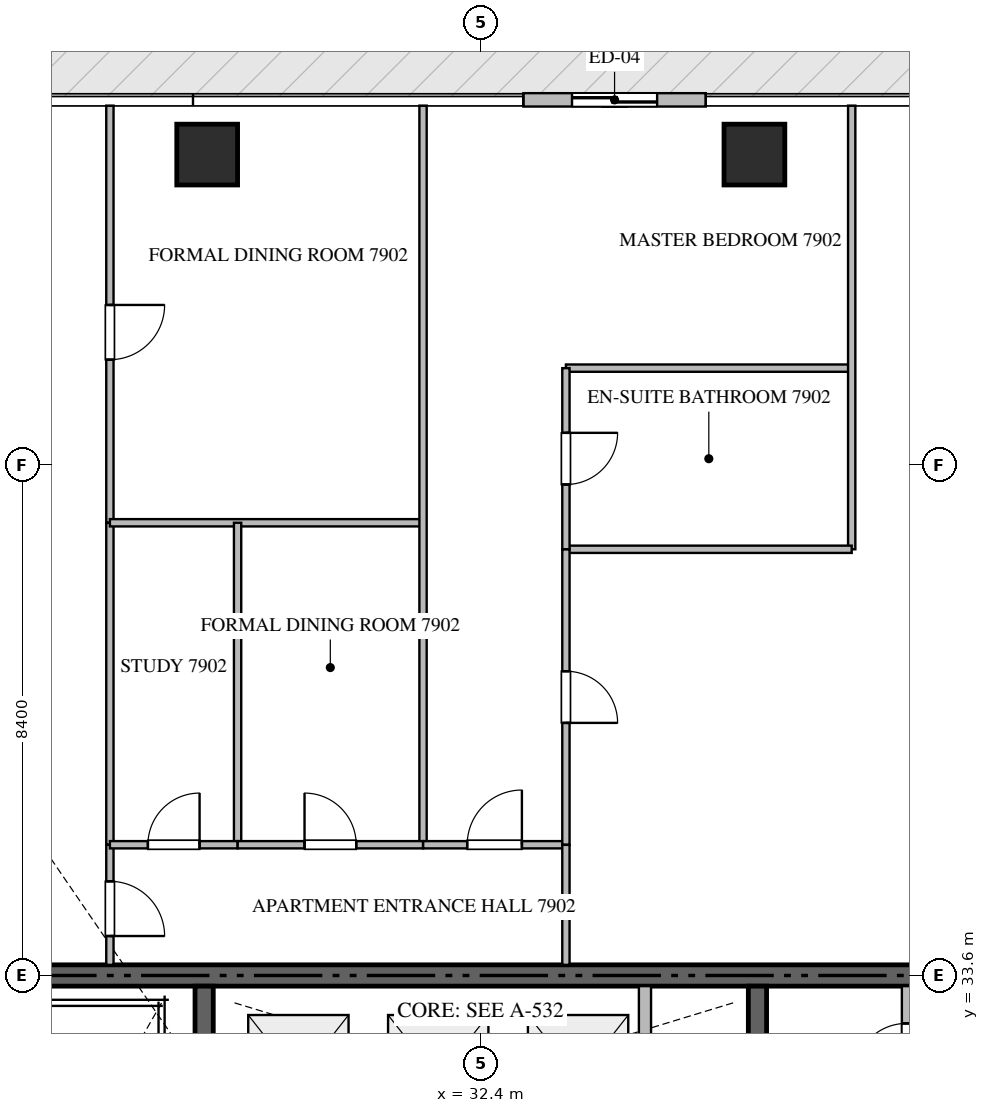
"""IFC4 building model, lengths in metres.
Left out: names, types, materials, properties, quantities, classifications, styles, units other than length and angle.
Written with IfcOpenShell. Run it as: python <this file> out.ifc"""

import sys

from ifc_helpers import new_model, si_unit, direction, frame, frame_2d, origin, origin_2d, place, context, subcontext, project, spatial, rectangle, extrude, source, transform, mapped, element, fill, save


model = new_model("IFC4")
c1 = context("Model", 3, precision=1e-05, world=origin(), true_north=direction((0.0, 1.0)))
c2 = subcontext(c1, "Body", "Model", "MODEL_VIEW")
j1 = project(units=[si_unit("LENGTHUNIT", "METRE"), si_unit("PLANEANGLEUNIT", "RADIAN")], contexts=[c1])
p1 = place(None, origin())
s1 = spatial("IfcSite", under=j1, at=p1, CompositionType="ELEMENT")
p2 = place(p1, origin())
s2 = spatial("IfcBuilding", under=s1, at=p2, CompositionType="ELEMENT")
p3 = place(p2, frame((0.0, 0.0, 317.75)))
s3 = spatial("IfcBuildingStorey", under=s2, at=p3, CompositionType="ELEMENT", Elevation=317.75)
p4 = place(p3, frame((41.4, 33.6, -0.26), z_axis=(0.0, 0.0, 1.0), x_axis=(-1.0, 0.0, 0.0)))
e1 = element("IfcWall", 1, at=p4, inside=s3, PredefinedType="SHEAR", context=c2, shape_type="SweptSolid", body=[
    extrude(rectangle(XDim=18.0, YDim=0.35, at=frame_2d((9.0, 0.0))), origin(), (0.0, 0.0, 1.0), 4.048),
])
p5 = place(p3, frame((27.85, 23.55, -0.26), z_axis=(0.0, 0.0, 1.0), x_axis=(0.0, 1.0, 0.0)))
e2 = element("IfcWall", 2, at=p5, inside=s3, PredefinedType="SHEAR", context=c2, shape_type="SweptSolid", body=[
    extrude(rectangle(XDim=9.875, YDim=0.3, at=frame_2d((4.938, 0.0))), origin(), (0.0, 0.0, 1.0), 4.048),
])
p6 = place(p3, frame((36.95, 27.05, -0.26), z_axis=(0.0, 0.0, 1.0), x_axis=(0.0, 1.0, 0.0)))
e3 = element("IfcWall", 3, at=p6, inside=s3, PredefinedType="SHEAR", context=c2, shape_type="SweptSolid", body=[
    extrude(rectangle(XDim=6.375, YDim=0.3, at=frame_2d((3.188, 0.0))), origin(), (0.0, 0.0, 1.0), 4.048),
])
m1 = source(origin(), c2, "Body", "SweptSolid", [
    extrude(rectangle(XDim=1.0, YDim=1.0, at=origin_2d()), origin(), (0.0, 0.0, 1.0), 4.05),
])
for number, where, z_axis, x_axis in (
    (4, (27.9, 47.1, -0.26), (0.0, 0.0, 1.0), (1.0, 0.0, 0.0)),
    (5, (36.9, 47.1, -0.26), (0.0, 0.0, 1.0), (1.0, 0.0, 0.0)),
):
    element("IfcColumn", number, at=place(p3, frame(where, z_axis=z_axis, x_axis=x_axis)), inside=s3, PredefinedType="COLUMN", context=c2, shape_type="MappedRepresentation", body=[
        mapped(m1, transform((0.0, 0.0, 0.0), scale=1.0)),
    ])
p7 = place(p3, frame((36.1, 48.0, 0.0), z_axis=(0.0, 0.0, 1.0), x_axis=(-1.0, 0.0, 0.0)))
e6 = element("IfcWall", 6, at=p7, inside=s3, PredefinedType="ELEMENTEDWALL", context=c2, shape_type="SweptSolid", body=[
    extrude(rectangle(XDim=3.0, YDim=0.22, at=frame_2d((1.5, 0.0))), origin(), (0.0, 0.0, 1.0), 3.775),
])
p8 = place(p7, frame((0.8, 0.0, 0.0)))
e7 = element("IfcOpeningElement", 7, at=p8, cuts=e6, PredefinedType="OPENING", context=c2, shape_type="SweptSolid", body=[
    extrude(rectangle(XDim=1.4, YDim=2.25, at=frame_2d((0.7, 1.125))), frame((0.0, 0.12, 0.0), z_axis=(0.0, -1.0, 0.0), x_axis=(1.0, 0.0, 0.0)), (0.0, 0.0, 1.0), 0.24),
])
p9 = place(p3, frame((35.1, 30.75, 0.0), z_axis=(0.0, 0.0, 1.0), x_axis=(0.0, 1.0, 0.0)))
e8 = element("IfcWall", 8, at=p9, inside=s3, PredefinedType="STANDARD", context=c2, shape_type="SweptSolid", body=[
    extrude(rectangle(XDim=2.675, YDim=0.2, at=frame_2d((1.337, 0.0))), origin(), (0.0, 0.0, 1.0), 3.79),
])
p10 = place(p3, frame((39.4, 31.35, 0.0), z_axis=(0.0, 0.0, 1.0), x_axis=(0.0, 1.0, 0.0)))
e9 = element("IfcWall", 9, at=p10, inside=s3, PredefinedType="PARTITIONING", context=c2, shape_type="SweptSolid", body=[
    extrude(rectangle(XDim=2.075, YDim=0.15, at=frame_2d((1.038, 0.0))), origin(), (0.0, 0.0, 1.0), 3.79),
])
p11 = place(p10, frame((0.612, 0.0, 0.0)))
e10 = element("IfcOpeningElement", 10, at=p11, cuts=e9, PredefinedType="OPENING", context=c2, shape_type="SweptSolid", body=[
    extrude(rectangle(XDim=0.85, YDim=2.1, at=frame_2d((0.425, 1.05))), frame((0.0, 0.085, 0.0), z_axis=(0.0, -1.0, 0.0), x_axis=(1.0, 0.0, 0.0)), (0.0, 0.0, 1.0), 0.17),
])
p12 = place(p3, frame((26.3, 35.75, 0.0), z_axis=(0.0, 0.0, 1.0), x_axis=(0.0, -1.0, 0.0)))
e11 = element("IfcWall", 11, at=p12, inside=s3, PredefinedType="PARTITIONING", context=c2, shape_type="SweptSolid", body=[
    extrude(rectangle(XDim=1.975, YDim=0.12, at=frame_2d((0.988, 0.0))), origin(), (0.0, 0.0, 1.0), 3.79),
])
p13 = place(p12, frame((0.601, 0.0, 0.0)))
e12 = element("IfcOpeningElement", 12, at=p13, cuts=e11, PredefinedType="OPENING", context=c2, shape_type="SweptSolid", body=[
    extrude(rectangle(XDim=0.9, YDim=2.1, at=frame_2d((0.45, 1.05))), frame((0.0, 0.07, 0.0), z_axis=(0.0, -1.0, 0.0), x_axis=(1.0, 0.0, 0.0)), (0.0, 0.0, 1.0), 0.14),
])
p14 = place(p3, frame((26.3, 47.905, 0.0), z_axis=(0.0, 0.0, 1.0), x_axis=(0.0, -1.0, 0.0)))
e13 = element("IfcWall", 13, at=p14, inside=s3, PredefinedType="PARTITIONING", context=c2, shape_type="SweptSolid", body=[
    extrude(rectangle(XDim=6.86, YDim=0.12, at=frame_2d((3.43, 0.0))), origin(), (0.0, 0.0, 1.0), 3.79),
])
p15 = place(p14, frame((3.278, 0.0, 0.0)))
e14 = element("IfcOpeningElement", 14, at=p15, cuts=e13, PredefinedType="OPENING", context=c2, shape_type="SweptSolid", body=[
    extrude(rectangle(XDim=0.9, YDim=2.1, at=frame_2d((0.45, 1.05))), frame((0.0, 0.07, 0.0), z_axis=(0.0, -1.0, 0.0), x_axis=(1.0, 0.0, 0.0)), (0.0, 0.0, 1.0), 0.14),
])
p16 = place(p3, frame((26.3, 41.043, 0.0), z_axis=(0.0, 0.0, 1.0), x_axis=(0.0, -1.0, 0.0)))
e15 = element("IfcWall", 15, at=p16, inside=s3, PredefinedType="PARTITIONING", context=c2, shape_type="SweptSolid", body=[
    extrude(rectangle(XDim=5.291, YDim=0.12, at=frame_2d((2.646, 0.0))), origin(), (0.0, 0.0, 1.0), 3.79),
])
p17 = place(p3, frame((26.3, 41.045, 0.0), z_axis=(0.0, 0.0, 1.0), x_axis=(1.0, 0.0, 0.0)))
e16 = element("IfcWall", 16, at=p17, inside=s3, PredefinedType="PARTITIONING", context=c2, shape_type="SweptSolid", body=[
    extrude(rectangle(XDim=5.15, YDim=0.12, at=frame_2d((2.575, 0.0))), origin(), (0.0, 0.0, 1.0), 3.79),
])
p18 = place(p3, frame((31.45, 47.905, 0.0), z_axis=(0.0, 0.0, 1.0), x_axis=(0.0, -1.0, 0.0)))
e17 = element("IfcWall", 17, at=p18, inside=s3, PredefinedType="PARTITIONING", context=c2, shape_type="SweptSolid", body=[
    extrude(rectangle(XDim=12.155, YDim=0.12, at=frame_2d((6.078, 0.0))), origin(), (0.0, 0.0, 1.0), 3.79),
])
p19 = place(p3, frame((28.4, 41.045, 0.0), z_axis=(0.0, 0.0, 1.0), x_axis=(0.0, -1.0, 0.0)))
e18 = element("IfcWall", 18, at=p19, inside=s3, PredefinedType="PARTITIONING", context=c2, shape_type="SweptSolid", body=[
    extrude(rectangle(XDim=5.295, YDim=0.12, at=frame_2d((2.647, 0.0))), origin(), (0.0, 0.0, 1.0), 3.79),
])
p20 = place(p3, frame((26.3, 35.75, 0.0), z_axis=(0.0, 0.0, 1.0), x_axis=(1.0, 0.0, 0.0)))
e19 = element("IfcWall", 19, at=p20, inside=s3, PredefinedType="PARTITIONING", context=c2, shape_type="SweptSolid", body=[
    extrude(rectangle(XDim=2.1, YDim=0.12, at=frame_2d((1.05, 0.0))), origin(), (0.0, 0.0, 1.0), 3.79),
])
p21 = place(p20, frame((0.625, 0.0, 0.0)))
e20 = element("IfcOpeningElement", 20, at=p21, cuts=e19, PredefinedType="OPENING", context=c2, shape_type="SweptSolid", body=[
    extrude(rectangle(XDim=0.85, YDim=2.1, at=frame_2d((0.425, 1.05))), frame((0.0, 0.07, 0.0), z_axis=(0.0, -1.0, 0.0), x_axis=(1.0, 0.0, 0.0)), (0.0, 0.0, 1.0), 0.14),
])
p22 = place(p3, frame((28.402, 35.75, 0.0), z_axis=(0.0, 0.0, 1.0), x_axis=(1.0, 0.0, 0.0)))
e21 = element("IfcWall", 21, at=p22, inside=s3, PredefinedType="PARTITIONING", context=c2, shape_type="SweptSolid", body=[
    extrude(rectangle(XDim=3.048, YDim=0.12, at=frame_2d((1.524, 0.0))), origin(), (0.0, 0.0, 1.0), 3.79),
])
p23 = place(p22, frame((1.099, 0.0, 0.0)))
e22 = element("IfcOpeningElement", 22, at=p23, cuts=e21, PredefinedType="OPENING", context=c2, shape_type="SweptSolid", body=[
    extrude(rectangle(XDim=0.85, YDim=2.1, at=frame_2d((0.425, 1.05))), frame((0.0, 0.07, 0.0), z_axis=(0.0, -1.0, 0.0), x_axis=(1.0, 0.0, 0.0)), (0.0, 0.0, 1.0), 0.14),
])
p24 = place(p3, frame((31.452, 35.75, 0.0), z_axis=(0.0, 0.0, 1.0), x_axis=(1.0, 0.0, 0.0)))
e23 = element("IfcWall", 23, at=p24, inside=s3, PredefinedType="PARTITIONING", context=c2, shape_type="SweptSolid", body=[
    extrude(rectangle(XDim=2.348, YDim=0.12, at=frame_2d((1.174, 0.0))), origin(), (0.0, 0.0, 1.0), 3.79),
])
p25 = place(p24, frame((0.724, 0.0, 0.0)))
e24 = element("IfcOpeningElement", 24, at=p25, cuts=e23, PredefinedType="OPENING", context=c2, shape_type="SweptSolid", body=[
    extrude(rectangle(XDim=0.9, YDim=2.1, at=frame_2d((0.45, 1.05))), frame((0.0, 0.07, 0.0), z_axis=(0.0, -1.0, 0.0), x_axis=(1.0, 0.0, 0.0)), (0.0, 0.0, 1.0), 0.14),
])
p26 = place(p3, frame((33.8, 43.588, 0.0), z_axis=(0.0, 0.0, 1.0), x_axis=(1.0, 0.0, 0.0)))
e25 = element("IfcWall", 25, at=p26, inside=s3, PredefinedType="PARTITIONING", context=c2, shape_type="SweptSolid", body=[
    extrude(rectangle(XDim=4.7, YDim=0.12, at=frame_2d((2.35, 0.0))), origin(), (0.0, 0.0, 1.0), 3.79),
])
p27 = place(p3, frame((38.5, 47.905, 0.0), z_axis=(0.0, 0.0, 1.0), x_axis=(0.0, -1.0, 0.0)))
e26 = element("IfcWall", 26, at=p27, inside=s3, PredefinedType="PARTITIONING", context=c2, shape_type="SweptSolid", body=[
    extrude(rectangle(XDim=7.296, YDim=0.12, at=frame_2d((3.648, 0.0))), origin(), (0.0, 0.0, 1.0), 3.79),
])
p28 = place(p3, frame((33.8, 40.609, 0.0), z_axis=(0.0, 0.0, 1.0), x_axis=(1.0, 0.0, 0.0)))
e27 = element("IfcWall", 27, at=p28, inside=s3, PredefinedType="PARTITIONING", context=c2, shape_type="SweptSolid", body=[
    extrude(rectangle(XDim=4.7, YDim=0.12, at=frame_2d((2.35, 0.0))), origin(), (0.0, 0.0, 1.0), 3.79),
])
p29 = place(p3, frame((33.8, 43.588, 0.0), z_axis=(0.0, 0.0, 1.0), x_axis=(0.0, -1.0, 0.0)))
e28 = element("IfcWall", 28, at=p29, inside=s3, PredefinedType="PARTITIONING", context=c2, shape_type="SweptSolid", body=[
    extrude(rectangle(XDim=2.979, YDim=0.12, at=frame_2d((1.49, 0.0))), origin(), (0.0, 0.0, 1.0), 3.79),
])
p30 = place(p29, frame((1.064, 0.0, 0.0)))
e29 = element("IfcOpeningElement", 29, at=p30, cuts=e28, PredefinedType="OPENING", context=c2, shape_type="SweptSolid", body=[
    extrude(rectangle(XDim=0.85, YDim=2.1, at=frame_2d((0.425, 1.05))), frame((0.0, 0.07, 0.0), z_axis=(0.0, -1.0, 0.0), x_axis=(1.0, 0.0, 0.0)), (0.0, 0.0, 1.0), 0.14),
])
p31 = place(p3, frame((33.8, 40.607, 0.0), z_axis=(0.0, 0.0, 1.0), x_axis=(0.0, -1.0, 0.0)))
e30 = element("IfcWall", 30, at=p31, inside=s3, PredefinedType="PARTITIONING", context=c2, shape_type="SweptSolid", body=[
    extrude(rectangle(XDim=4.857, YDim=0.12, at=frame_2d((2.428, 0.0))), origin(), (0.0, 0.0, 1.0), 3.79),
])
p32 = place(p31, frame((2.003, 0.0, 0.0)))
e31 = element("IfcOpeningElement", 31, at=p32, cuts=e30, PredefinedType="OPENING", context=c2, shape_type="SweptSolid", body=[
    extrude(rectangle(XDim=0.85, YDim=2.1, at=frame_2d((0.425, 1.05))), frame((0.0, 0.07, 0.0), z_axis=(0.0, -1.0, 0.0), x_axis=(1.0, 0.0, 0.0)), (0.0, 0.0, 1.0), 0.14),
])
p33 = place(p3, frame((33.8, 35.748, 0.0), z_axis=(0.0, 0.0, 1.0), x_axis=(0.0, -1.0, 0.0)))
e32 = element("IfcWall", 32, at=p33, inside=s3, PredefinedType="PARTITIONING", context=c2, shape_type="SweptSolid", body=[
    extrude(rectangle(XDim=1.973, YDim=0.12, at=frame_2d((0.987, 0.0))), origin(), (0.0, 0.0, 1.0), 3.79),
])
m2 = source(origin(), c2, "Body", "SweptSolid", [
    extrude(rectangle(XDim=1.4, YDim=2.25, at=frame_2d((0.7, 1.125))), frame((0.0, 0.025, 0.0), z_axis=(0.0, -1.0, 0.0), x_axis=(1.0, 0.0, 0.0)), (0.0, 0.0, 1.0), 0.05),
])
p34 = place(p8, origin())
e33 = element("IfcDoor", 33, at=p34, inside=s3, OperationType="SLIDING_TO_LEFT", PredefinedType="DOOR", context=c2, shape_type="MappedRepresentation", body=[
    mapped(m2, transform((0.0, 0.0, 0.0), scale=1.0)),
])
fill(e7, e33)
m3 = source(origin(), c2, "Body", "SweptSolid", [
    extrude(rectangle(XDim=0.85, YDim=2.1, at=frame_2d((0.425, 1.05))), frame((0.0, 0.025, 0.0), z_axis=(0.0, -1.0, 0.0), x_axis=(1.0, 0.0, 0.0)), (0.0, 0.0, 1.0), 0.05),
])
p35 = place(p11, origin())
e34 = element("IfcDoor", 34, at=p35, inside=s3, OperationType="SINGLE_SWING_LEFT", PredefinedType="DOOR", context=c2, shape_type="MappedRepresentation", body=[
    mapped(m3, transform((0.0, 0.0, 0.0), scale=1.0)),
])
fill(e10, e34)
m4 = source(origin(), c2, "Body", "SweptSolid", [
    extrude(rectangle(XDim=0.9, YDim=2.1, at=frame_2d((0.45, 1.05))), frame((0.0, 0.025, 0.0), z_axis=(0.0, -1.0, 0.0), x_axis=(1.0, 0.0, 0.0)), (0.0, 0.0, 1.0), 0.05),
])
p36 = place(p13, origin())
e35 = element("IfcDoor", 35, at=p36, inside=s3, OperationType="SINGLE_SWING_RIGHT", PredefinedType="DOOR", context=c2, shape_type="MappedRepresentation", body=[
    mapped(m4, transform((0.0, 0.0, 0.0), scale=1.0)),
])
fill(e12, e35)
p37 = place(p15, origin())
e36 = element("IfcDoor", 36, at=p37, inside=s3, OperationType="SINGLE_SWING_LEFT", PredefinedType="DOOR", context=c2, shape_type="MappedRepresentation", body=[
    mapped(m4, transform((0.0, 0.0, 0.0), scale=1.0)),
])
fill(e14, e36)
p38 = place(p21, origin())
e37 = element("IfcDoor", 37, at=p38, inside=s3, OperationType="SINGLE_SWING_RIGHT", PredefinedType="DOOR", context=c2, shape_type="MappedRepresentation", body=[
    mapped(m3, transform((0.0, 0.0, 0.0), scale=1.0)),
])
fill(e20, e37)
p39 = place(p23, origin())
e38 = element("IfcDoor", 38, at=p39, inside=s3, OperationType="SINGLE_SWING_LEFT", PredefinedType="DOOR", context=c2, shape_type="MappedRepresentation", body=[
    mapped(m3, transform((0.0, 0.0, 0.0), scale=1.0)),
])
fill(e22, e38)
p40 = place(p25, origin())
e39 = element("IfcDoor", 39, at=p40, inside=s3, OperationType="SINGLE_SWING_RIGHT", PredefinedType="DOOR", context=c2, shape_type="MappedRepresentation", body=[
    mapped(m4, transform((0.0, 0.0, 0.0), scale=1.0)),
])
fill(e24, e39)
p41 = place(p30, origin())
e40 = element("IfcDoor", 40, at=p41, inside=s3, OperationType="SINGLE_SWING_LEFT", PredefinedType="DOOR", context=c2, shape_type="MappedRepresentation", body=[
    mapped(m3, transform((0.0, 0.0, 0.0), scale=1.0)),
])
fill(e29, e40)
p42 = place(p32, origin())
e41 = element("IfcDoor", 41, at=p42, inside=s3, OperationType="SINGLE_SWING_RIGHT", PredefinedType="DOOR", context=c2, shape_type="MappedRepresentation", body=[
    mapped(m3, transform((0.0, 0.0, 0.0), scale=1.0)),
])
fill(e31, e41)
save(model, sys.argv[1])
